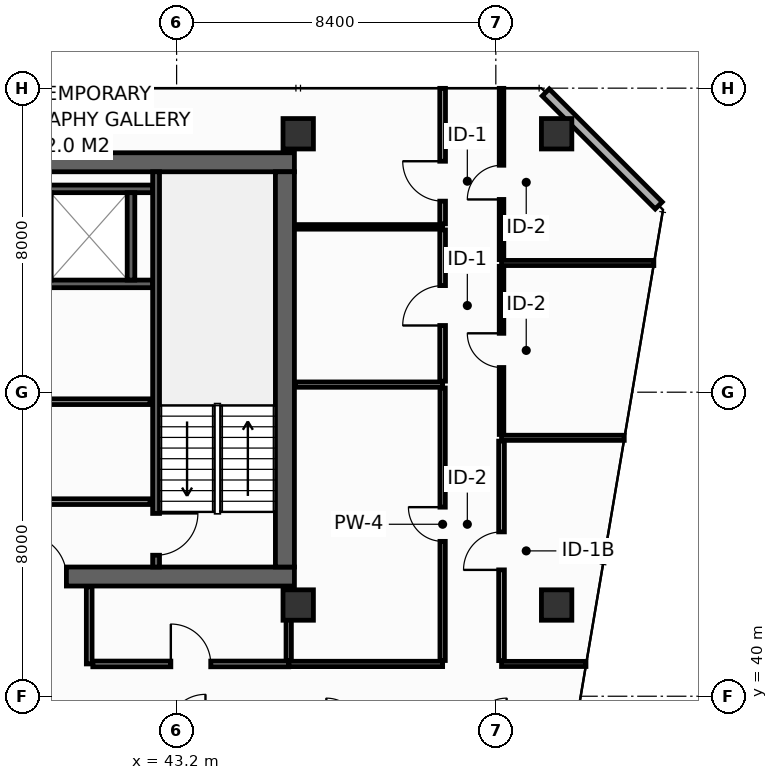
"""IFC4 building model, lengths in metres.
Left out: names, types, materials, properties, quantities, classifications, styles, units other than length and angle.
Written with IfcOpenShell. Run it as: python <this file> out.ifc"""

import sys

from ifc_helpers import new_model, si_unit, direction, frame, frame_2d, origin, origin_2d, place, context, subcontext, project, spatial, rectangle, hollow_rectangle, extrude, element, fill, save


model = new_model("IFC4")
c1 = context("Model", 3, precision=1e-05, world=origin(), true_north=direction((0.0, 1.0)))
c2 = subcontext(c1, "Body", "Model", "MODEL_VIEW")
j1 = project(units=[si_unit("LENGTHUNIT", "METRE"), si_unit("PLANEANGLEUNIT", "RADIAN")], contexts=[c1])
p1 = place(None, origin())
s1 = spatial("IfcSite", under=j1, at=p1, CompositionType="ELEMENT")
p2 = place(p1, origin())
s2 = spatial("IfcBuilding", under=s1, at=p2, CompositionType="ELEMENT")
p3 = place(p2, frame((0.0, 0.0, 209.4)))
s3 = spatial("IfcBuildingStorey", under=s2, at=p3, CompositionType="ELEMENT", Elevation=209.4)
p4 = place(p3, frame((13.6, 43.15, 0.0), z_axis=(0.0, 0.0, 1.0), x_axis=(1.0, 0.0, 0.0)))
e1 = element("IfcWall", 1, at=p4, inside=s3, PredefinedType="SHEAR", context=c2, shape_type="SweptSolid", body=[
    extrude(rectangle(XDim=32.7, YDim=0.5, at=frame_2d((16.35, 0.0))), origin(), (0.0, 0.0, 1.0), 3.55),
])
p5 = place(p4, frame((5.4, 0.0, 0.0)))
e2 = element("IfcOpeningElement", 2, at=p5, cuts=e1, PredefinedType="OPENING", context=c2, shape_type="SweptSolid", body=[
    extrude(rectangle(XDim=1.1, YDim=2.15, at=frame_2d((0.55, 1.075))), frame((0.0, 0.26, 0.0), z_axis=(0.0, -1.0, 0.0), x_axis=(1.0, 0.0, 0.0)), (0.0, 0.0, 1.0), 0.52),
])
p6 = place(p4, frame((25.6, 0.0, 0.0)))
e3 = element("IfcOpeningElement", 3, at=p6, cuts=e1, PredefinedType="OPENING", context=c2, shape_type="SweptSolid", body=[
    extrude(rectangle(XDim=1.1, YDim=2.15, at=frame_2d((0.55, 1.075))), frame((0.0, 0.26, 0.0), z_axis=(0.0, -1.0, 0.0), x_axis=(1.0, 0.0, 0.0)), (0.0, 0.0, 1.0), 0.52),
])
p7 = place(p3, frame((13.6, 54.05, 0.0), z_axis=(0.0, 0.0, 1.0), x_axis=(1.0, 0.0, 0.0)))
e4 = element("IfcWall", 4, at=p7, inside=s3, PredefinedType="SHEAR", context=c2, shape_type="SweptSolid", body=[
    extrude(rectangle(XDim=32.7, YDim=0.5, at=frame_2d((16.35, 0.0))), origin(), (0.0, 0.0, 1.0), 3.55),
])
p8 = place(p3, frame((46.05, 43.4, 0.0), z_axis=(0.0, 0.0, 1.0), x_axis=(0.0, 1.0, 0.0)))
e5 = element("IfcWall", 5, at=p8, inside=s3, PredefinedType="SHEAR", context=c2, shape_type="SweptSolid", body=[
    extrude(rectangle(XDim=10.4, YDim=0.5, at=frame_2d((5.2, 0.0))), origin(), (0.0, 0.0, 1.0), 3.55),
])
for number, where, z_axis, x_axis in (
    (6, (46.4, 54.8, 0.0), (0.0, 0.0, 1.0), (1.0, 0.0, 0.0)),
    (7, (53.2, 54.8, 0.0), (0.0, 0.0, 1.0), (1.0, 0.0, 0.0)),
    (8, (46.4, 42.4, 0.0), (0.0, 0.0, 1.0), (1.0, 0.0, 0.0)),
    (9, (53.2, 42.4, 0.0), (0.0, 0.0, 1.0), (1.0, 0.0, 0.0)),
):
    element("IfcColumn", number, at=place(p3, frame(where, z_axis=z_axis, x_axis=x_axis)), inside=s3, PredefinedType="COLUMN", context=c2, shape_type="SweptSolid", body=[
        extrude(hollow_rectangle(XDim=0.8, YDim=0.8, WallThickness=0.036, at=origin_2d()), origin(), (0.0, 0.0, 1.0), 3.8),
    ])
for number, where, z_axis, x_axis in (
    (10, (39.525, 50.85, 0.0), (0.0, 0.0, 1.0), (1.0, 0.0, 0.0)),
    (11, (39.525, 53.35, 0.0), (0.0, 0.0, 1.0), (1.0, 0.0, 0.0)),
):
    element("IfcWall", number, at=place(p3, frame(where, z_axis=z_axis, x_axis=x_axis)), inside=s3, PredefinedType="SHEAR", context=c2, shape_type="SweptSolid", body=[
        extrude(rectangle(XDim=3.045, YDim=0.2, at=frame_2d((1.522, 0.0))), origin(), (0.0, 0.0, 1.0), 3.55),
    ])
p9 = place(p3, frame((42.0, 50.95, 0.0), z_axis=(0.0, 0.0, 1.0), x_axis=(0.0, 1.0, 0.0)))
e12 = element("IfcWall", 12, at=p9, inside=s3, PredefinedType="SHEAR", context=c2, shape_type="SweptSolid", body=[
    extrude(rectangle(XDim=2.3, YDim=0.2, at=frame_2d((1.15, 0.0))), origin(), (0.0, 0.0, 1.0), 3.55),
])
p10 = place(p3, frame((42.66, 53.8, 0.0), z_axis=(0.0, 0.0, 1.0), x_axis=(0.0, -1.0, 0.0)))
e13 = element("IfcWall", 13, at=p10, inside=s3, PredefinedType="SHEAR", context=c2, shape_type="SweptSolid", body=[
    extrude(rectangle(XDim=10.4, YDim=0.18, at=frame_2d((5.2, 0.0))), origin(), (0.0, 0.0, 1.0), 3.55),
])
p11 = place(p10, frame((8.99, 0.0, 0.0)))
e14 = element("IfcOpeningElement", 14, at=p11, cuts=e13, PredefinedType="OPENING", context=c2, shape_type="SweptSolid", body=[
    extrude(rectangle(XDim=1.1, YDim=2.15, at=frame_2d((0.55, 1.075))), frame((0.0, 0.1, 0.0), z_axis=(0.0, -1.0, 0.0), x_axis=(1.0, 0.0, 0.0)), (0.0, 0.0, 1.0), 0.2),
])
p12 = place(p3, frame((34.05, 45.12, 0.0), z_axis=(0.0, 0.0, 1.0), x_axis=(1.0, 0.0, 0.0)))
e15 = element("IfcWall", 15, at=p12, inside=s3, PredefinedType="PARTITIONING", context=c2, shape_type="SweptSolid", body=[
    extrude(rectangle(XDim=8.45, YDim=0.15, at=frame_2d((4.225, 0.0))), origin(), (0.0, 0.0, 1.0), 3.55),
])
p13 = place(p12, frame((3.6, 0.0, 0.0)))
e16 = element("IfcOpeningElement", 16, at=p13, cuts=e15, PredefinedType="OPENING", context=c2, shape_type="SweptSolid", body=[
    extrude(rectangle(XDim=0.95, YDim=2.15, at=frame_2d((0.475, 1.075))), frame((0.0, 0.085, 0.0), z_axis=(0.0, -1.0, 0.0), x_axis=(1.0, 0.0, 0.0)), (0.0, 0.0, 1.0), 0.17),
])
p14 = place(p3, frame((34.05, 47.75, 0.0), z_axis=(0.0, 0.0, 1.0), x_axis=(1.0, 0.0, 0.0)))
e17 = element("IfcWall", 17, at=p14, inside=s3, PredefinedType="PARTITIONING", context=c2, shape_type="SweptSolid", body=[
    extrude(rectangle(XDim=8.45, YDim=0.15, at=frame_2d((4.225, 0.0))), origin(), (0.0, 0.0, 1.0), 3.55),
])
p15 = place(p3, frame((55.887, 52.913, 0.0), z_axis=(0.0, 0.0, 1.0), x_axis=(-0.707106781187, 0.707106781187, 0.0)))
e18 = element("IfcWall", 18, at=p15, inside=s3, PredefinedType="STANDARD", context=c2, shape_type="SweptSolid", body=[
    extrude(rectangle(XDim=4.206, YDim=0.26, at=frame_2d((2.103, 0.0))), origin(), (0.0, 0.0, 1.0), 3.55),
])
p16 = place(p3, frame((46.15, 40.85, 0.0), z_axis=(0.0, 0.0, 1.0), x_axis=(1.0, 0.0, 0.0)))
e19 = element("IfcWall", 19, at=p16, inside=s3, PredefinedType="PARTITIONING", context=c2, shape_type="SweptSolid", body=[
    extrude(rectangle(XDim=4.05, YDim=0.14, at=frame_2d((2.025, 0.0))), origin(), (0.0, 0.0, 1.0), 3.55),
])
p17 = place(p3, frame((46.15, 40.94, 0.0), z_axis=(0.0, 0.0, 1.0), x_axis=(0.0, 1.0, 0.0)))
e20 = element("IfcWall", 20, at=p17, inside=s3, PredefinedType="PARTITIONING", context=c2, shape_type="SweptSolid", body=[
    extrude(rectangle(XDim=1.94, YDim=0.14, at=frame_2d((0.97, 0.0))), origin(), (0.0, 0.0, 1.0), 3.55),
])
p18 = place(p3, frame((46.32, 48.2, 0.0), z_axis=(0.0, 0.0, 1.0), x_axis=(1.0, 0.0, 0.0)))
e21 = element("IfcWall", 21, at=p18, inside=s3, PredefinedType="PARTITIONING", context=c2, shape_type="SweptSolid", body=[
    extrude(rectangle(XDim=3.88, YDim=0.14, at=frame_2d((1.94, 0.0))), origin(), (0.0, 0.0, 1.0), 3.55),
])
p19 = place(p3, frame((50.2, 40.94, 0.0), z_axis=(0.0, 0.0, 1.0), x_axis=(0.0, 1.0, 0.0)))
e22 = element("IfcWall", 22, at=p19, inside=s3, PredefinedType="PARTITIONING", context=c2, shape_type="SweptSolid", body=[
    extrude(rectangle(XDim=7.17, YDim=0.14, at=frame_2d((3.585, 0.0))), origin(), (0.0, 0.0, 1.0), 2.835),
])
p20 = place(p19, frame((3.135, 0.0, 0.0)))
e23 = element("IfcOpeningElement", 23, at=p20, cuts=e22, PredefinedType="OPENING", context=c2, shape_type="SweptSolid", body=[
    extrude(rectangle(XDim=0.9, YDim=2.1, at=frame_2d((0.45, 1.05))), frame((0.0, 0.08, 0.0), z_axis=(0.0, -1.0, 0.0), x_axis=(1.0, 0.0, 0.0)), (0.0, 0.0, 1.0), 0.16),
])
p21 = place(p3, frame((46.32, 52.35, 0.0), z_axis=(0.0, 0.0, 1.0), x_axis=(1.0, 0.0, 0.0)))
e24 = element("IfcWall", 24, at=p21, inside=s3, PredefinedType="PARTITIONING", context=c2, shape_type="SweptSolid", body=[
    extrude(rectangle(XDim=3.88, YDim=0.12, at=frame_2d((1.94, 0.0))), origin(), (0.0, 0.0, 1.0), 3.55),
])
p22 = place(p3, frame((50.2, 48.29, 0.0), z_axis=(0.0, 0.0, 1.0), x_axis=(0.0, 1.0, 0.0)))
e25 = element("IfcWall", 25, at=p22, inside=s3, PredefinedType="PARTITIONING", context=c2, shape_type="SweptSolid", body=[
    extrude(rectangle(XDim=3.98, YDim=0.15, at=frame_2d((1.99, 0.0))), origin(), (0.0, 0.0, 1.0), 3.55),
])
p23 = place(p22, frame((1.465, 0.0, 0.0)))
e26 = element("IfcOpeningElement", 26, at=p23, cuts=e25, PredefinedType="OPENING", context=c2, shape_type="SweptSolid", body=[
    extrude(rectangle(XDim=1.05, YDim=2.15, at=frame_2d((0.525, 1.075))), frame((0.0, 0.085, 0.0), z_axis=(0.0, -1.0, 0.0), x_axis=(1.0, 0.0, 0.0)), (0.0, 0.0, 1.0), 0.17),
])
p24 = place(p3, frame((50.2, 52.43, 0.0), z_axis=(0.0, 0.0, 1.0), x_axis=(0.0, 1.0, 0.0)))
e27 = element("IfcWall", 27, at=p24, inside=s3, PredefinedType="PARTITIONING", context=c2, shape_type="SweptSolid", body=[
    extrude(rectangle(XDim=3.565, YDim=0.15, at=frame_2d((1.783, 0.0))), origin(), (0.0, 0.0, 1.0), 2.935),
])
p25 = place(p24, frame((0.597, 0.0, 0.0)))
e28 = element("IfcOpeningElement", 28, at=p25, cuts=e27, PredefinedType="OPENING", context=c2, shape_type="SweptSolid", body=[
    extrude(rectangle(XDim=1.05, YDim=2.15, at=frame_2d((0.525, 1.075))), frame((0.0, 0.085, 0.0), z_axis=(0.0, -1.0, 0.0), x_axis=(1.0, 0.0, 0.0)), (0.0, 0.0, 1.0), 0.17),
])
p26 = place(p3, frame((51.75, 40.85, 0.0), z_axis=(0.0, 0.0, 1.0), x_axis=(1.0, 0.0, 0.0)))
e29 = element("IfcWall", 29, at=p26, inside=s3, PredefinedType="PARTITIONING", context=c2, shape_type="SweptSolid", body=[
    extrude(rectangle(XDim=2.222, YDim=0.135, at=frame_2d((1.111, 0.0))), origin(), (0.0, 0.0, 1.0), 3.035),
])
p27 = place(p3, frame((51.75, 46.8, 0.0), z_axis=(0.0, 0.0, 1.0), x_axis=(1.0, 0.0, 0.0)))
e30 = element("IfcWall", 30, at=p27, inside=s3, PredefinedType="PARTITIONING", context=c2, shape_type="SweptSolid", body=[
    extrude(rectangle(XDim=3.229, YDim=0.135, at=frame_2d((1.615, 0.0))), origin(), (0.0, 0.0, 1.0), 2.835),
])
p28 = place(p3, frame((51.75, 51.4, 0.0), z_axis=(0.0, 0.0, 1.0), x_axis=(1.0, 0.0, 0.0)))
e31 = element("IfcWall", 31, at=p28, inside=s3, PredefinedType="PARTITIONING", context=c2, shape_type="SweptSolid", body=[
    extrude(rectangle(XDim=4.008, YDim=0.135, at=frame_2d((2.004, 0.0))), origin(), (0.0, 0.0, 1.0), 2.835),
])
p29 = place(p3, frame((51.75, 40.938, 0.0), z_axis=(0.0, 0.0, 1.0), x_axis=(0.0, 1.0, 0.0)))
e32 = element("IfcWall", 32, at=p29, inside=s3, PredefinedType="PARTITIONING", context=c2, shape_type="SweptSolid", body=[
    extrude(rectangle(XDim=5.775, YDim=0.15, at=frame_2d((2.887, 0.0))), origin(), (0.0, 0.0, 1.0), 2.835),
])
p30 = place(p29, frame((2.387, 0.0, 0.0)))
e33 = element("IfcOpeningElement", 33, at=p30, cuts=e32, PredefinedType="OPENING", context=c2, shape_type="SweptSolid", body=[
    extrude(rectangle(XDim=1.0, YDim=2.15, at=frame_2d((0.5, 1.075))), frame((0.0, 0.085, 0.0), z_axis=(0.0, -1.0, 0.0), x_axis=(1.0, 0.0, 0.0)), (0.0, 0.0, 1.0), 0.17),
])
p31 = place(p3, frame((51.75, 46.887, 0.0), z_axis=(0.0, 0.0, 1.0), x_axis=(0.0, 1.0, 0.0)))
e34 = element("IfcWall", 34, at=p31, inside=s3, PredefinedType="PARTITIONING", context=c2, shape_type="SweptSolid", body=[
    extrude(rectangle(XDim=4.425, YDim=0.12, at=frame_2d((2.212, 0.0))), origin(), (0.0, 0.0, 1.0), 3.55),
])
p32 = place(p31, frame((1.762, 0.0, 0.0)))
e35 = element("IfcOpeningElement", 35, at=p32, cuts=e34, PredefinedType="OPENING", context=c2, shape_type="SweptSolid", body=[
    extrude(rectangle(XDim=0.9, YDim=2.1, at=frame_2d((0.45, 1.05))), frame((0.0, 0.07, 0.0), z_axis=(0.0, -1.0, 0.0), x_axis=(1.0, 0.0, 0.0)), (0.0, 0.0, 1.0), 0.14),
])
p33 = place(p3, frame((51.75, 51.488, 0.0), z_axis=(0.0, 0.0, 1.0), x_axis=(0.0, 1.0, 0.0)))
e36 = element("IfcWall", 36, at=p33, inside=s3, PredefinedType="PARTITIONING", context=c2, shape_type="SweptSolid", body=[
    extrude(rectangle(XDim=4.508, YDim=0.12, at=frame_2d((2.254, 0.0))), origin(), (0.0, 0.0, 1.0), 2.935),
])
p34 = place(p33, frame((1.584, 0.0, 0.0)))
e37 = element("IfcOpeningElement", 37, at=p34, cuts=e36, PredefinedType="OPENING", context=c2, shape_type="SweptSolid", body=[
    extrude(rectangle(XDim=0.9, YDim=2.1, at=frame_2d((0.45, 1.05))), frame((0.0, 0.07, 0.0), z_axis=(0.0, -1.0, 0.0), x_axis=(1.0, 0.0, 0.0)), (0.0, 0.0, 1.0), 0.14),
])
p35 = place(p3, frame((40.9, 40.85, 0.0), z_axis=(0.0, 0.0, 1.0), x_axis=(0.0, 1.0, 0.0)))
e38 = element("IfcWall", 38, at=p35, inside=s3, PredefinedType="PARTITIONING", context=c2, shape_type="SweptSolid", body=[
    extrude(rectangle(XDim=2.03, YDim=0.15, at=frame_2d((1.015, 0.0))), origin(), (0.0, 0.0, 1.0), 3.55),
])
p36 = place(p3, frame((40.995, 40.85, 0.0), z_axis=(0.0, 0.0, 1.0), x_axis=(1.0, 0.0, 0.0)))
e39 = element("IfcWall", 39, at=p36, inside=s3, PredefinedType="PARTITIONING", context=c2, shape_type="SweptSolid", body=[
    extrude(rectangle(XDim=5.155, YDim=0.15, at=frame_2d((2.577, 0.0))), origin(), (0.0, 0.0, 1.0), 3.55),
])
p37 = place(p36, frame((2.053, 0.0, 0.0)))
e40 = element("IfcOpeningElement", 40, at=p37, cuts=e39, PredefinedType="OPENING", context=c2, shape_type="SweptSolid", body=[
    extrude(rectangle(XDim=1.05, YDim=2.15, at=frame_2d((0.525, 1.075))), frame((0.0, 0.085, 0.0), z_axis=(0.0, -1.0, 0.0), x_axis=(1.0, 0.0, 0.0)), (0.0, 0.0, 1.0), 0.17),
])
p38 = place(p11, origin())
e41 = element("IfcDoor", 41, at=p38, inside=s3, OperationType="SINGLE_SWING_LEFT", PredefinedType="DOOR", context=c2, shape_type="SweptSolid", body=[
    extrude(rectangle(XDim=1.1, YDim=2.15, at=frame_2d((0.55, 1.075))), frame((0.0, 0.025, 0.0), z_axis=(0.0, -1.0, 0.0), x_axis=(1.0, 0.0, 0.0)), (0.0, 0.0, 1.0), 0.05),
])
fill(e14, e41)
p39 = place(p6, origin())
e42 = element("IfcDoor", 42, at=p39, inside=s3, OperationType="SINGLE_SWING_LEFT", PredefinedType="DOOR", context=c2, shape_type="SweptSolid", body=[
    extrude(rectangle(XDim=1.1, YDim=2.15, at=frame_2d((0.55, 1.075))), frame((0.0, 0.025, 0.0), z_axis=(0.0, -1.0, 0.0), x_axis=(1.0, 0.0, 0.0)), (0.0, 0.0, 1.0), 0.05),
])
fill(e3, e42)
p40 = place(p20, origin())
e43 = element("IfcDoor", 43, at=p40, inside=s3, OperationType="SINGLE_SWING_RIGHT", PredefinedType="DOOR", context=c2, shape_type="SweptSolid", body=[
    extrude(rectangle(XDim=0.9, YDim=2.1, at=frame_2d((0.45, 1.05))), frame((0.0, 0.025, 0.0), z_axis=(0.0, -1.0, 0.0), x_axis=(1.0, 0.0, 0.0)), (0.0, 0.0, 1.0), 0.05),
])
fill(e23, e43)
p41 = place(p23, origin())
e44 = element("IfcDoor", 44, at=p41, inside=s3, OperationType="SINGLE_SWING_LEFT", PredefinedType="DOOR", context=c2, shape_type="SweptSolid", body=[
    extrude(rectangle(XDim=1.05, YDim=2.15, at=frame_2d((0.525, 1.075))), frame((0.0, 0.025, 0.0), z_axis=(0.0, -1.0, 0.0), x_axis=(1.0, 0.0, 0.0)), (0.0, 0.0, 1.0), 0.05),
])
fill(e26, e44)
p42 = place(p25, origin())
e45 = element("IfcDoor", 45, at=p42, inside=s3, OperationType="SINGLE_SWING_RIGHT", PredefinedType="DOOR", context=c2, shape_type="SweptSolid", body=[
    extrude(rectangle(XDim=1.05, YDim=2.15, at=frame_2d((0.525, 1.075))), frame((0.0, 0.025, 0.0), z_axis=(0.0, -1.0, 0.0), x_axis=(1.0, 0.0, 0.0)), (0.0, 0.0, 1.0), 0.05),
])
fill(e28, e45)
p43 = place(p30, origin())
e46 = element("IfcDoor", 46, at=p43, inside=s3, OperationType="SINGLE_SWING_LEFT", PredefinedType="DOOR", context=c2, shape_type="SweptSolid", body=[
    extrude(rectangle(XDim=1.0, YDim=2.15, at=frame_2d((0.5, 1.075))), frame((0.0, 0.025, 0.0), z_axis=(0.0, -1.0, 0.0), x_axis=(1.0, 0.0, 0.0)), (0.0, 0.0, 1.0), 0.05),
])
fill(e33, e46)
p44 = place(p32, origin())
e47 = element("IfcDoor", 47, at=p44, inside=s3, OperationType="SINGLE_SWING_RIGHT", PredefinedType="DOOR", context=c2, shape_type="SweptSolid", body=[
    extrude(rectangle(XDim=0.9, YDim=2.1, at=frame_2d((0.45, 1.05))), frame((0.0, 0.025, 0.0), z_axis=(0.0, -1.0, 0.0), x_axis=(1.0, 0.0, 0.0)), (0.0, 0.0, 1.0), 0.05),
])
fill(e35, e47)
p45 = place(p34, origin())
e48 = element("IfcDoor", 48, at=p45, inside=s3, OperationType="SINGLE_SWING_LEFT", PredefinedType="DOOR", context=c2, shape_type="SweptSolid", body=[
    extrude(rectangle(XDim=0.9, YDim=2.1, at=frame_2d((0.45, 1.05))), frame((0.0, 0.025, 0.0), z_axis=(0.0, -1.0, 0.0), x_axis=(1.0, 0.0, 0.0)), (0.0, 0.0, 1.0), 0.05),
])
fill(e37, e48)
p46 = place(p37, origin())
e49 = element("IfcDoor", 49, at=p46, inside=s3, OperationType="SINGLE_SWING_LEFT", PredefinedType="DOOR", context=c2, shape_type="SweptSolid", body=[
    extrude(rectangle(XDim=1.05, YDim=2.15, at=frame_2d((0.525, 1.075))), frame((0.0, 0.025, 0.0), z_axis=(0.0, -1.0, 0.0), x_axis=(1.0, 0.0, 0.0)), (0.0, 0.0, 1.0), 0.05),
])
fill(e40, e49)
save(model, sys.argv[1])
